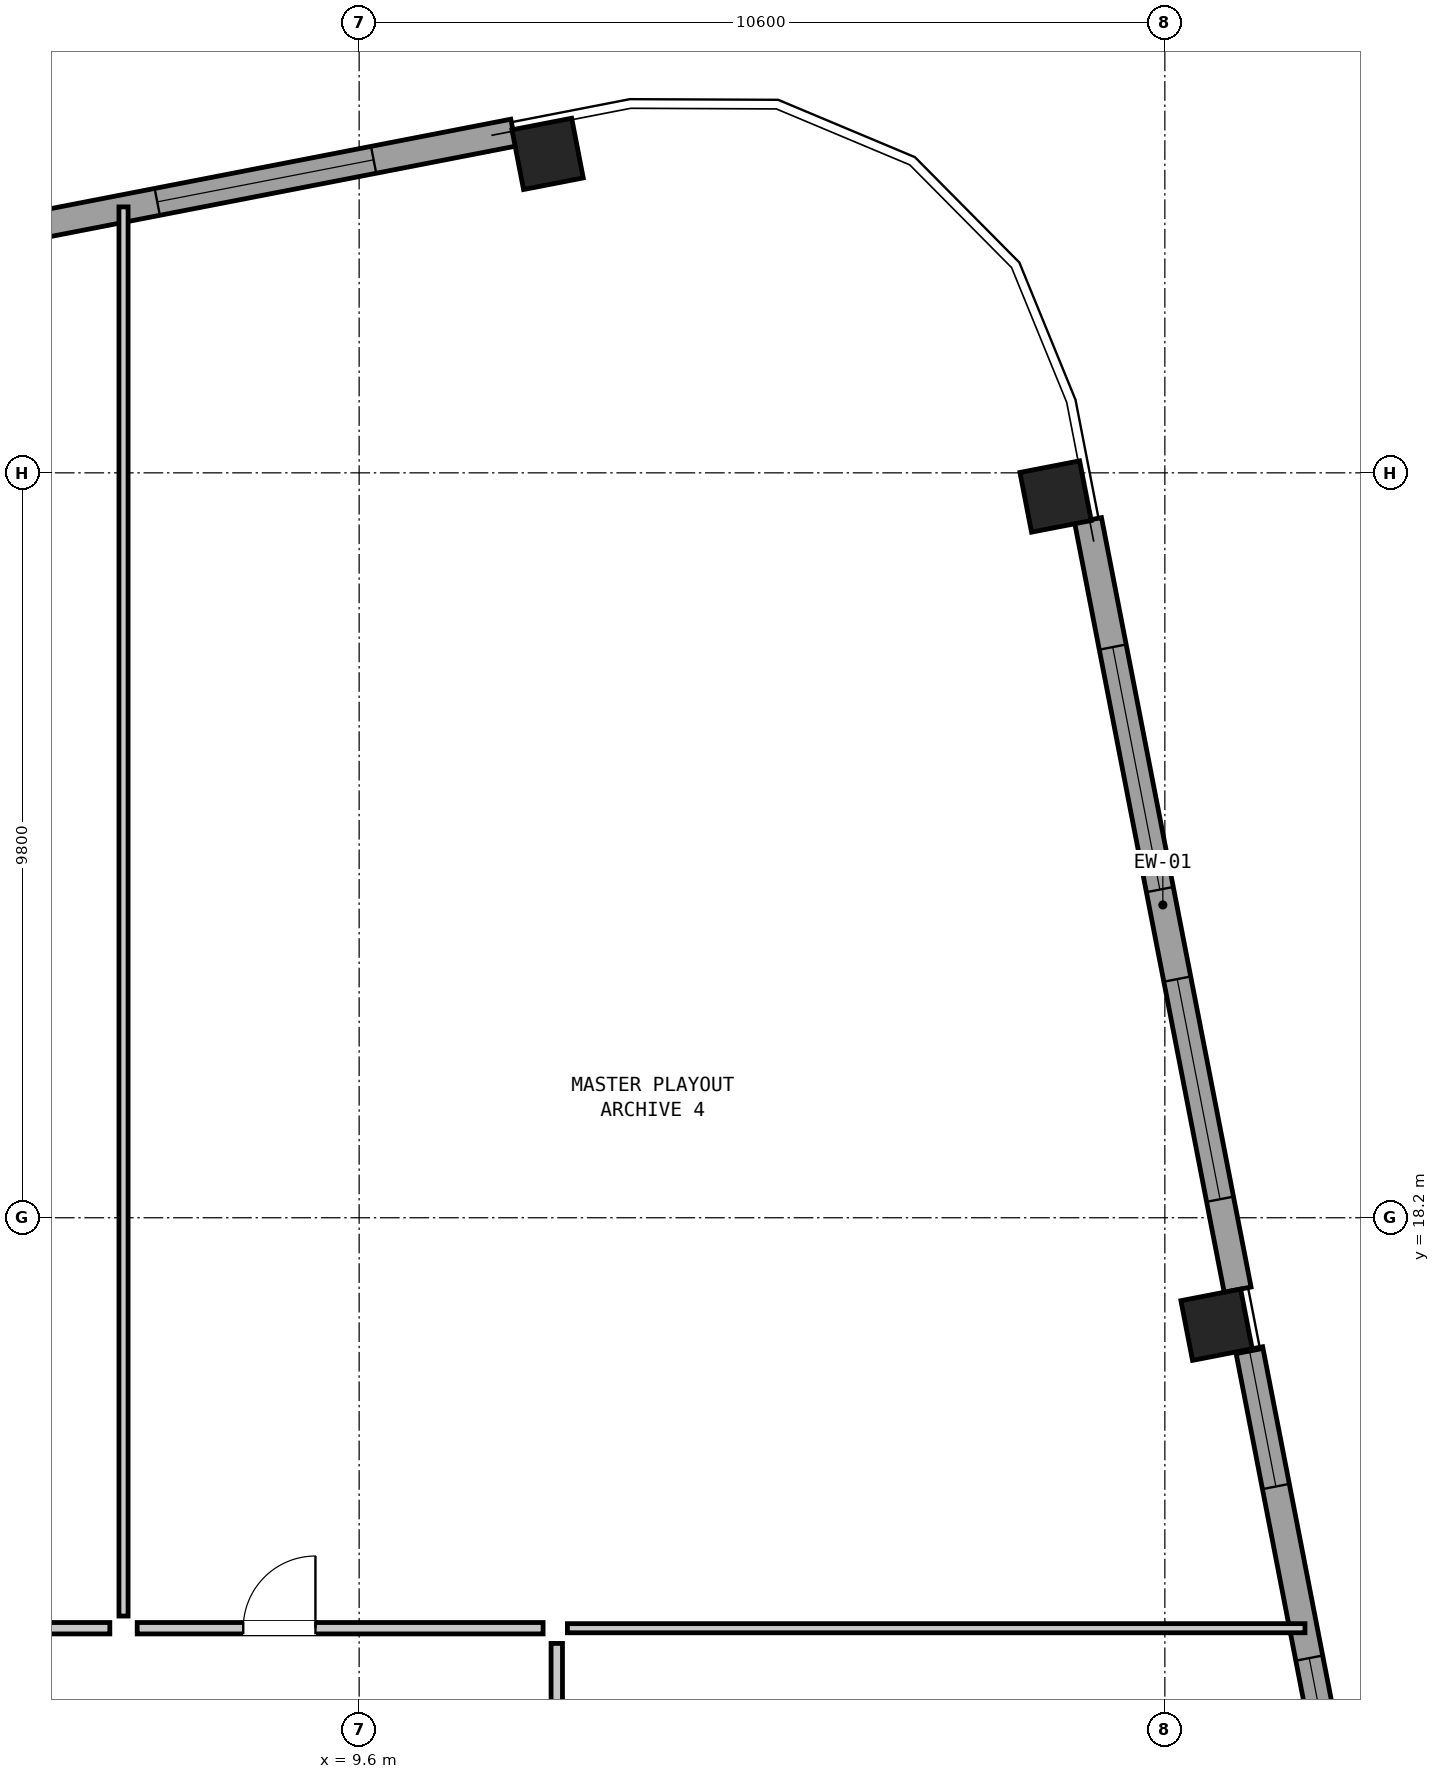
"""IFC4 building model, lengths in metres.
Left out: names, types, materials, properties, quantities, classifications, styles, units other than length and angle.
Written with IfcOpenShell. Run it as: python <this file> out.ifc"""

import sys

from ifc_helpers import new_model, si_unit, direction, frame, frame_2d, origin, origin_2d, place, context, subcontext, project, spatial, rectangle, hollow_rectangle, extrude, element, fill, save


model = new_model("IFC4")
c1 = context("Model", 3, precision=1e-05, world=origin(), true_north=direction((0.0, 1.0)))
c2 = subcontext(c1, "Body", "Model", "MODEL_VIEW")
j1 = project(units=[si_unit("LENGTHUNIT", "METRE"), si_unit("PLANEANGLEUNIT", "RADIAN")], contexts=[c1])
p1 = place(None, origin())
s1 = spatial("IfcSite", under=j1, at=p1, CompositionType="ELEMENT")
p2 = place(p1, origin())
s2 = spatial("IfcBuilding", under=s1, at=p2, CompositionType="ELEMENT")
p3 = place(p2, frame((0.0, 0.0, 134.15)))
s3 = spatial("IfcBuildingStorey", under=s2, at=p3, CompositionType="ELEMENT", Elevation=134.15)
for number, where, z_axis, x_axis in (
    (1, (20.88, 16.792, 0.0), (0.0, 0.0, 1.0), (-0.191, 0.982, 0.0)),
    (2, (18.762, 27.689, 0.0), (0.0, 0.0, 1.0), (-0.191, 0.982, 0.0)),
    (3, (12.08, 32.196, 0.0), (0.0, 0.0, 1.0), (0.982, 0.191, 0.0)),
):
    element("IfcColumn", number, at=place(p3, frame(where, z_axis=z_axis, x_axis=x_axis)), inside=s3, PredefinedType="COLUMN", context=c2, shape_type="SweptSolid", body=[
        extrude(hollow_rectangle(XDim=0.8, YDim=0.8, WallThickness=0.05, at=origin_2d()), origin(), (0.0, 0.0, 1.0), 3.05),
    ])
p4 = place(p3, frame((19.19, 27.376, 0.0), z_axis=(0.0, 0.0, 1.0), x_axis=(0.190822765986, -0.981624506612, 0.0)))
e4 = element("IfcWall", 4, at=p4, inside=s3, PredefinedType="SOLIDWALL", context=c2, shape_type="SweptSolid", body=[
    extrude(rectangle(XDim=10.312, YDim=0.36, at=frame_2d((5.156, 0.0))), origin(), (0.0, 0.0, 1.0), 2.067),
])
p5 = place(p4, frame((1.7, 0.0, 0.2)))
e5 = element("IfcOpeningElement", 5, at=p5, cuts=e4, PredefinedType="OPENING", context=c2, shape_type="SweptSolid", body=[
    extrude(rectangle(XDim=3.25, YDim=0.85, at=frame_2d((1.625, 0.425))), frame((0.0, 0.192, 0.0), z_axis=(0.0, -1.0, 0.0), x_axis=(1.0, 0.0, 0.0)), (0.0, 0.0, 1.0), 0.384),
])
p6 = place(p4, frame((6.15, 0.0, 0.95)))
e6 = element("IfcOpeningElement", 6, at=p6, cuts=e4, PredefinedType="OPENING", context=c2, shape_type="SweptSolid", body=[
    extrude(rectangle(XDim=2.95, YDim=0.95, at=frame_2d((1.475, 0.475))), frame((0.0, 0.192, 0.0), z_axis=(0.0, -1.0, 0.0), x_axis=(1.0, 0.0, 0.0)), (0.0, 0.0, 1.0), 0.384),
])
p7 = place(p3, frame((21.31, 16.469, 0.0), z_axis=(0.0, 0.0, 1.0), x_axis=(0.190811924826, -0.981626614016, 0.0)))
e7 = element("IfcWall", 7, at=p7, inside=s3, PredefinedType="SOLIDWALL", context=c2, shape_type="SweptSolid", body=[
    extrude(rectangle(XDim=10.3, YDim=0.36, at=frame_2d((5.15, 0.0))), origin(), (0.0, 0.0, 1.0), 2.067),
])
p8 = place(p7, frame((0.038, 0.0, 0.2)))
e8 = element("IfcOpeningElement", 8, at=p8, cuts=e7, PredefinedType="OPENING", context=c2, shape_type="SweptSolid", body=[
    extrude(rectangle(XDim=1.8, YDim=1.25, at=frame_2d((0.9, 0.625))), frame((0.0, 0.192, 0.0), z_axis=(0.0, -1.0, 0.0), x_axis=(1.0, 0.0, 0.0)), (0.0, 0.0, 1.0), 0.384),
])
p9 = place(p7, frame((4.138, 0.0, 0.7)))
e9 = element("IfcOpeningElement", 9, at=p9, cuts=e7, PredefinedType="OPENING", context=c2, shape_type="SweptSolid", body=[
    extrude(rectangle(XDim=2.1, YDim=1.2, at=frame_2d((1.05, 0.6))), frame((0.0, 0.192, 0.0), z_axis=(0.0, -1.0, 0.0), x_axis=(1.0, 0.0, 0.0)), (0.0, 0.0, 1.0), 0.384),
])
p10 = place(p7, frame((8.388, 0.0, 0.2)))
e10 = element("IfcOpeningElement", 10, at=p10, cuts=e7, PredefinedType="OPENING", context=c2, shape_type="SweptSolid", body=[
    extrude(rectangle(XDim=1.85, YDim=1.2, at=frame_2d((0.925, 0.6))), frame((0.0, 0.192, 0.0), z_axis=(0.0, -1.0, 0.0), x_axis=(1.0, 0.0, 0.0)), (0.0, 0.0, 1.0), 0.384),
])
p11 = place(p3, frame((1.507, 30.508, 0.0), z_axis=(0.0, 0.0, 1.0), x_axis=(0.981628941133, 0.190799952646, 0.0)))
e11 = element("IfcWall", 11, at=p11, inside=s3, PredefinedType="SOLIDWALL", context=c2, shape_type="SweptSolid", body=[
    extrude(rectangle(XDim=10.312, YDim=0.36, at=frame_2d((5.156, 0.0))), origin(), (0.0, 0.0, 1.0), 2.067),
])
p12 = place(p11, frame((1.288, 0.0, 0.95)))
e12 = element("IfcOpeningElement", 12, at=p12, cuts=e11, PredefinedType="OPENING", context=c2, shape_type="SweptSolid", body=[
    extrude(rectangle(XDim=2.75, YDim=0.95, at=frame_2d((1.375, 0.475))), frame((0.0, 0.192, 0.0), z_axis=(0.0, -1.0, 0.0), x_axis=(1.0, 0.0, 0.0)), (0.0, 0.0, 1.0), 0.384),
])
p13 = place(p11, frame((5.538, 0.0, 0.2)))
e13 = element("IfcOpeningElement", 13, at=p13, cuts=e11, PredefinedType="OPENING", context=c2, shape_type="SweptSolid", body=[
    extrude(rectangle(XDim=2.9, YDim=0.9, at=frame_2d((1.45, 0.45))), frame((0.0, 0.192, 0.0), z_axis=(0.0, -1.0, 0.0), x_axis=(1.0, 0.0, 0.0)), (0.0, 0.0, 1.0), 0.384),
])
p14 = place(p3, frame((12.34, 12.8, 0.0), z_axis=(0.0, 0.0, 1.0), x_axis=(1.0, 0.0, 0.0)))
e14 = element("IfcWall", 14, at=p14, inside=s3, PredefinedType="PARTITIONING", context=c2, shape_type="SweptSolid", body=[
    extrude(rectangle(XDim=9.703, YDim=0.12, at=frame_2d((4.852, 0.0))), origin(), (0.0, 0.0, 1.0), 2.83),
])
p15 = place(p3, frame((6.5, 12.96, 0.0), z_axis=(0.0, 0.0, 1.0), x_axis=(0.0, 1.0, 0.0)))
e15 = element("IfcWall", 15, at=p15, inside=s3, PredefinedType="PARTITIONING", context=c2, shape_type="SweptSolid", body=[
    extrude(rectangle(XDim=18.539, YDim=0.12, at=frame_2d((9.27, 0.0))), origin(), (0.0, 0.0, 1.0), 2.347),
])
p16 = place(p3, frame((0.18, 12.8, 0.0), z_axis=(0.0, 0.0, 1.0), x_axis=(1.0, 0.0, 0.0)))
e16 = element("IfcWall", 16, at=p16, inside=s3, PredefinedType="PARTITIONING", context=c2, shape_type="SweptSolid", body=[
    extrude(rectangle(XDim=6.14, YDim=0.15, at=frame_2d((3.07, 0.0))), origin(), (0.0, 0.0, 1.0), 2.83),
])
p17 = place(p16, frame((2.595, 0.0, 0.0)))
e17 = element("IfcOpeningElement", 17, at=p17, cuts=e16, PredefinedType="OPENING", context=c2, shape_type="SweptSolid", body=[
    extrude(rectangle(XDim=0.95, YDim=2.1, at=frame_2d((0.475, 1.05))), frame((0.0, 0.087, 0.0), z_axis=(0.0, -1.0, 0.0), x_axis=(1.0, 0.0, 0.0)), (0.0, 0.0, 1.0), 0.174),
])
p18 = place(p3, frame((6.68, 12.8, 0.0), z_axis=(0.0, 0.0, 1.0), x_axis=(1.0, 0.0, 0.0)))
e18 = element("IfcWall", 18, at=p18, inside=s3, PredefinedType="PARTITIONING", context=c2, shape_type="SweptSolid", body=[
    extrude(rectangle(XDim=5.34, YDim=0.15, at=frame_2d((2.67, 0.0))), origin(), (0.0, 0.0, 1.0), 2.83),
])
p19 = place(p18, frame((1.395, 0.0, 0.0)))
e19 = element("IfcOpeningElement", 19, at=p19, cuts=e18, PredefinedType="OPENING", context=c2, shape_type="SweptSolid", body=[
    extrude(rectangle(XDim=0.95, YDim=2.1, at=frame_2d((0.475, 1.05))), frame((0.0, 0.087, 0.0), z_axis=(0.0, -1.0, 0.0), x_axis=(1.0, 0.0, 0.0)), (0.0, 0.0, 1.0), 0.174),
])
p20 = place(p3, frame((12.2, 3.8, 0.0), z_axis=(0.0, 0.0, 1.0), x_axis=(0.0, 1.0, 0.0)))
e20 = element("IfcWall", 20, at=p20, inside=s3, PredefinedType="PARTITIONING", context=c2, shape_type="SweptSolid", body=[
    extrude(rectangle(XDim=8.8, YDim=0.15, at=frame_2d((4.4, 0.0))), origin(), (0.0, 0.0, 1.0), 2.83),
])
p21 = place(p20, frame((3.925, 0.0, 0.0)))
e21 = element("IfcOpeningElement", 21, at=p21, cuts=e20, PredefinedType="OPENING", context=c2, shape_type="SweptSolid", body=[
    extrude(rectangle(XDim=0.95, YDim=2.1, at=frame_2d((0.475, 1.05))), frame((0.0, 0.087, 0.0), z_axis=(0.0, -1.0, 0.0), x_axis=(1.0, 0.0, 0.0)), (0.0, 0.0, 1.0), 0.174),
])
p22 = place(p5, origin())
e22 = element("IfcWindow", 22, at=p22, inside=s3, PartitioningType="SINGLE_PANEL", PredefinedType="WINDOW", context=c2, shape_type="SweptSolid", body=[
    extrude(rectangle(XDim=3.25, YDim=0.85, at=frame_2d((1.625, 0.425))), frame((0.0, 0.03, 0.0), z_axis=(0.0, -1.0, 0.0), x_axis=(1.0, 0.0, 0.0)), (0.0, 0.0, 1.0), 0.06),
])
fill(e5, e22)
p23 = place(p6, origin())
e23 = element("IfcWindow", 23, at=p23, inside=s3, PartitioningType="SINGLE_PANEL", PredefinedType="WINDOW", context=c2, shape_type="SweptSolid", body=[
    extrude(rectangle(XDim=2.95, YDim=0.95, at=frame_2d((1.475, 0.475))), frame((0.0, 0.03, 0.0), z_axis=(0.0, -1.0, 0.0), x_axis=(1.0, 0.0, 0.0)), (0.0, 0.0, 1.0), 0.06),
])
fill(e6, e23)
p24 = place(p8, origin())
e24 = element("IfcWindow", 24, at=p24, inside=s3, PartitioningType="SINGLE_PANEL", PredefinedType="WINDOW", context=c2, shape_type="SweptSolid", body=[
    extrude(rectangle(XDim=1.8, YDim=1.25, at=frame_2d((0.9, 0.625))), frame((0.0, 0.03, 0.0), z_axis=(0.0, -1.0, 0.0), x_axis=(1.0, 0.0, 0.0)), (0.0, 0.0, 1.0), 0.06),
])
fill(e8, e24)
p25 = place(p9, origin())
e25 = element("IfcWindow", 25, at=p25, inside=s3, PartitioningType="SINGLE_PANEL", PredefinedType="WINDOW", context=c2, shape_type="SweptSolid", body=[
    extrude(rectangle(XDim=2.1, YDim=1.2, at=frame_2d((1.05, 0.6))), frame((0.0, 0.03, 0.0), z_axis=(0.0, -1.0, 0.0), x_axis=(1.0, 0.0, 0.0)), (0.0, 0.0, 1.0), 0.06),
])
fill(e9, e25)
p26 = place(p13, origin())
e26 = element("IfcWindow", 26, at=p26, inside=s3, PartitioningType="SINGLE_PANEL", PredefinedType="WINDOW", context=c2, shape_type="SweptSolid", body=[
    extrude(rectangle(XDim=2.9, YDim=0.9, at=frame_2d((1.45, 0.45))), frame((0.0, 0.03, 0.0), z_axis=(0.0, -1.0, 0.0), x_axis=(1.0, 0.0, 0.0)), (0.0, 0.0, 1.0), 0.06),
])
fill(e13, e26)
p27 = place(p19, origin())
e27 = element("IfcDoor", 27, at=p27, inside=s3, OperationType="SINGLE_SWING_RIGHT", PredefinedType="DOOR", context=c2, shape_type="SweptSolid", body=[
    extrude(rectangle(XDim=0.95, YDim=2.1, at=frame_2d((0.475, 1.05))), frame((0.0, 0.025, 0.0), z_axis=(0.0, -1.0, 0.0), x_axis=(1.0, 0.0, 0.0)), (0.0, 0.0, 1.0), 0.05),
])
fill(e19, e27)
save(model, sys.argv[1])
